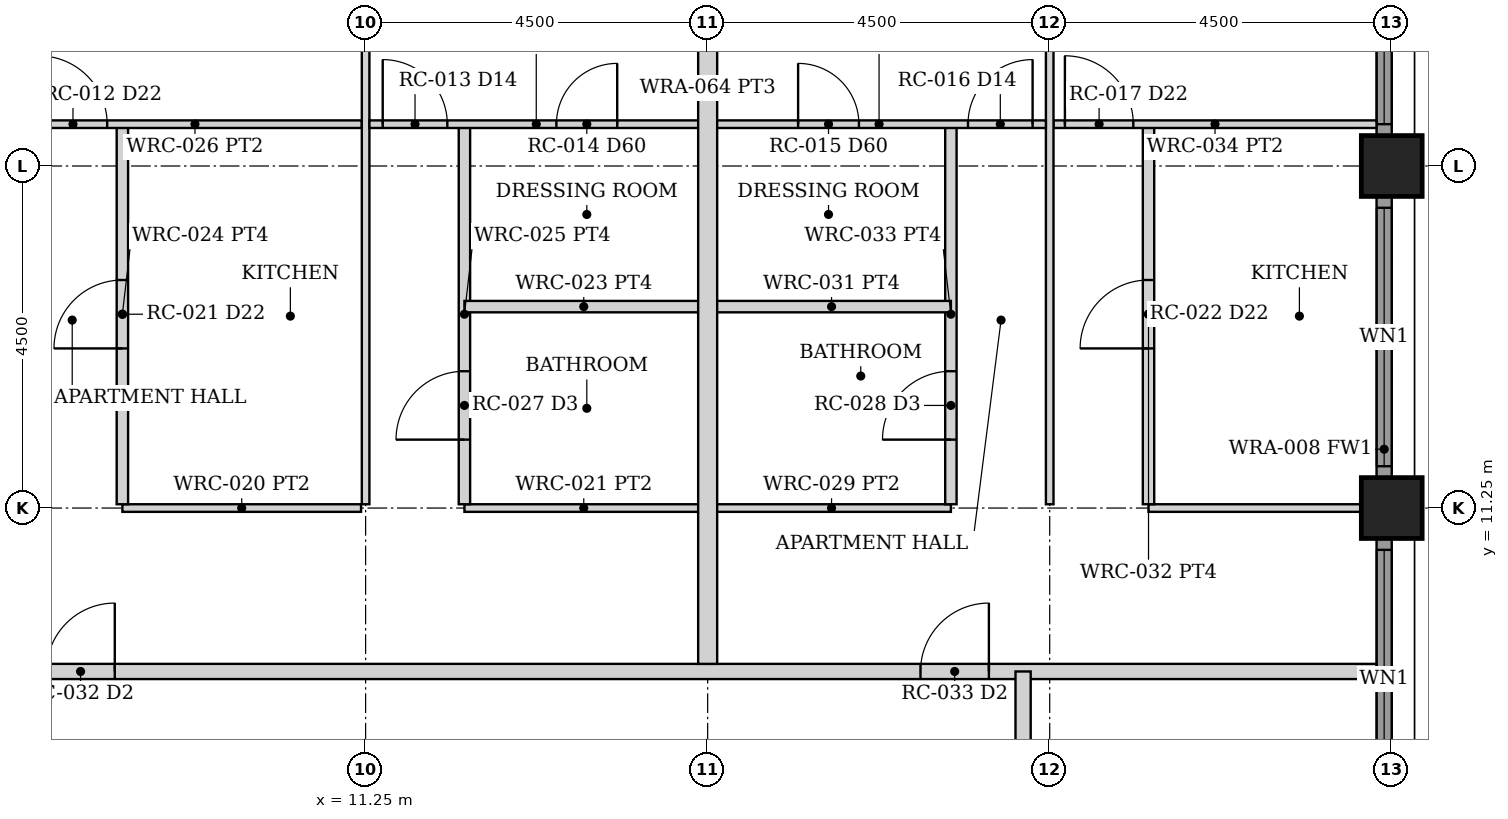
"""IFC4 building model, lengths in metres.
Left out: names, types, materials, properties, quantities, classifications, styles, units other than length and angle.
Written with IfcOpenShell. Run it as: python <this file> out.ifc"""

import sys

from ifc_helpers import new_model, si_unit, direction, frame, frame_2d, origin, origin_2d, place, context, subcontext, project, spatial, rectangle, hollow_rectangle, extrude, element, fill, save


model = new_model("IFC4")
c1 = context("Model", 3, precision=1e-05, world=origin(), true_north=direction((0.0, 1.0)))
c2 = subcontext(c1, "Body", "Model", "MODEL_VIEW")
j1 = project(units=[si_unit("LENGTHUNIT", "METRE"), si_unit("PLANEANGLEUNIT", "RADIAN")], contexts=[c1])
p1 = place(None, origin())
s1 = spatial("IfcSite", under=j1, at=p1, CompositionType="ELEMENT")
p2 = place(p1, origin())
s2 = spatial("IfcBuilding", under=s1, at=p2, CompositionType="ELEMENT")
p3 = place(p2, frame((0.0, 0.0, 47.5)))
s3 = spatial("IfcBuildingStorey", under=s2, at=p3, CompositionType="ELEMENT", Elevation=47.5)
for number, where, z_axis, x_axis in (
    (1, (24.75, 11.25, 0.0), (0.0, 0.0, 1.0), (1.0, 0.0, 0.0)),
    (2, (24.75, 15.75, 0.0), (0.0, 0.0, 1.0), (1.0, 0.0, 0.0)),
):
    element("IfcColumn", number, at=place(p3, frame(where, z_axis=z_axis, x_axis=x_axis)), inside=s3, PredefinedType="COLUMN", context=c2, shape_type="SweptSolid", body=[
        extrude(hollow_rectangle(XDim=0.8, YDim=0.8, WallThickness=0.07, at=origin_2d()), origin(), (0.0, 0.0, 1.0), 3.5),
    ])
p4 = place(p3, frame((24.65, 7.155, 0.0), z_axis=(0.0, 0.0, 1.0), x_axis=(0.0, 1.0, 0.0)))
e3 = element("IfcWall", 3, at=p4, inside=s3, PredefinedType="SOLIDWALL", context=c2, shape_type="SweptSolid", body=[
    extrude(rectangle(XDim=3.69, YDim=0.2, at=frame_2d((1.845, 0.0))), origin(), (0.0, 0.0, 1.0), 2.379),
])
p5 = place(p4, frame((0.145, 0.0, 0.3)))
e4 = element("IfcOpeningElement", 4, at=p5, cuts=e3, PredefinedType="OPENING", context=c2, shape_type="SweptSolid", body=[
    extrude(rectangle(XDim=3.4, YDim=1.929, at=frame_2d((1.7, 0.964))), frame((0.0, 0.11, 0.0), z_axis=(0.0, -1.0, 0.0), x_axis=(1.0, 0.0, 0.0)), (0.0, 0.0, 1.0), 0.22),
])
p6 = place(p3, frame((24.65, 11.655, 0.0), z_axis=(0.0, 0.0, 1.0), x_axis=(0.0, 1.0, 0.0)))
e5 = element("IfcWall", 5, at=p6, inside=s3, PredefinedType="SOLIDWALL", context=c2, shape_type="SweptSolid", body=[
    extrude(rectangle(XDim=3.69, YDim=0.2, at=frame_2d((1.845, 0.0))), origin(), (0.0, 0.0, 1.0), 2.379),
])
p7 = place(p6, frame((0.145, 0.0, 0.3)))
e6 = element("IfcOpeningElement", 6, at=p7, cuts=e5, PredefinedType="OPENING", context=c2, shape_type="SweptSolid", body=[
    extrude(rectangle(XDim=3.4, YDim=1.929, at=frame_2d((1.7, 0.964))), frame((0.0, 0.11, 0.0), z_axis=(0.0, -1.0, 0.0), x_axis=(1.0, 0.0, 0.0)), (0.0, 0.0, 1.0), 0.22),
])
p8 = place(p3, frame((24.65, 16.155, 0.0), z_axis=(0.0, 0.0, 1.0), x_axis=(0.0, 1.0, 0.0)))
e7 = element("IfcWall", 7, at=p8, inside=s3, PredefinedType="SOLIDWALL", context=c2, shape_type="SweptSolid", body=[
    extrude(rectangle(XDim=3.69, YDim=0.2, at=frame_2d((1.845, 0.0))), origin(), (0.0, 0.0, 1.0), 2.379),
])
p9 = place(p8, frame((0.145, 0.0, 0.3)))
e8 = element("IfcOpeningElement", 8, at=p9, cuts=e7, PredefinedType="OPENING", context=c2, shape_type="SweptSolid", body=[
    extrude(rectangle(XDim=3.4, YDim=1.929, at=frame_2d((1.7, 0.964))), frame((0.0, 0.11, 0.0), z_axis=(0.0, -1.0, 0.0), x_axis=(1.0, 0.0, 0.0)), (0.0, 0.0, 1.0), 0.22),
])
p10 = place(p3, frame((-24.55, 9.1, 0.0), z_axis=(0.0, 0.0, 1.0), x_axis=(1.0, 0.0, 0.0)))
e9 = element("IfcWall", 9, at=p10, inside=s3, PredefinedType="PARTITIONING", context=c2, shape_type="SweptSolid", body=[
    extrude(rectangle(XDim=49.1, YDim=0.2, at=frame_2d((24.55, 0.0))), origin(), (0.0, 0.0, 1.0), 2.373),
])
p11 = place(p10, frame((5.1, 0.0, 0.0)))
e10 = element("IfcOpeningElement", 10, at=p11, cuts=e9, PredefinedType="OPENING", context=c2, shape_type="SweptSolid", body=[
    extrude(rectangle(XDim=0.9, YDim=2.1, at=frame_2d((0.45, 1.05))), frame((0.0, 0.11, 0.0), z_axis=(0.0, -1.0, 0.0), x_axis=(1.0, 0.0, 0.0)), (0.0, 0.0, 1.0), 0.22),
])
p12 = place(p10, frame((13.6, 0.0, 0.0)))
e11 = element("IfcOpeningElement", 11, at=p12, cuts=e9, PredefinedType="OPENING", context=c2, shape_type="SweptSolid", body=[
    extrude(rectangle(XDim=0.9, YDim=2.1, at=frame_2d((0.45, 1.05))), frame((0.0, 0.11, 0.0), z_axis=(0.0, -1.0, 0.0), x_axis=(1.0, 0.0, 0.0)), (0.0, 0.0, 1.0), 0.22),
])
p13 = place(p10, frame((18.1, 0.0, 0.0)))
e12 = element("IfcOpeningElement", 12, at=p13, cuts=e9, PredefinedType="OPENING", context=c2, shape_type="SweptSolid", body=[
    extrude(rectangle(XDim=0.9, YDim=2.1, at=frame_2d((0.45, 1.05))), frame((0.0, 0.11, 0.0), z_axis=(0.0, -1.0, 0.0), x_axis=(1.0, 0.0, 0.0)), (0.0, 0.0, 1.0), 0.22),
])
p14 = place(p10, frame((31.6, 0.0, 0.0)))
e13 = element("IfcOpeningElement", 13, at=p14, cuts=e9, PredefinedType="OPENING", context=c2, shape_type="SweptSolid", body=[
    extrude(rectangle(XDim=0.9, YDim=2.1, at=frame_2d((0.45, 1.05))), frame((0.0, 0.11, 0.0), z_axis=(0.0, -1.0, 0.0), x_axis=(1.0, 0.0, 0.0)), (0.0, 0.0, 1.0), 0.22),
])
p15 = place(p10, frame((43.1, 0.0, 0.0)))
e14 = element("IfcOpeningElement", 14, at=p15, cuts=e9, PredefinedType="OPENING", context=c2, shape_type="SweptSolid", body=[
    extrude(rectangle(XDim=0.9, YDim=2.1, at=frame_2d((0.45, 1.05))), frame((0.0, 0.11, 0.0), z_axis=(0.0, -1.0, 0.0), x_axis=(1.0, 0.0, 0.0)), (0.0, 0.0, 1.0), 0.22),
])
p16 = place(p3, frame((19.9, -9.1, 0.0), z_axis=(0.0, 0.0, 1.0), x_axis=(0.0, 1.0, 0.0)))
e15 = element("IfcWall", 15, at=p16, inside=s3, PredefinedType="PARTITIONING", context=c2, shape_type="SweptSolid", body=[
    extrude(rectangle(XDim=18.2, YDim=0.2, at=frame_2d((9.1, 0.0))), origin(), (0.0, 0.0, 1.0), 2.373),
])
p17 = place(p16, frame((8.6, 0.0, 0.0)))
e16 = element("IfcOpeningElement", 16, at=p17, cuts=e15, PredefinedType="OPENING", context=c2, shape_type="SweptSolid", body=[
    extrude(rectangle(XDim=1.0, YDim=2.1, at=frame_2d((0.5, 1.05))), frame((0.0, 0.11, 0.0), z_axis=(0.0, -1.0, 0.0), x_axis=(1.0, 0.0, 0.0)), (0.0, 0.0, 1.0), 0.22),
])
p18 = place(p3, frame((8.05, 11.25, 0.0), z_axis=(0.0, 0.0, 1.0), x_axis=(1.0, 0.0, 0.0)))
e17 = element("IfcWall", 17, at=p18, inside=s3, PredefinedType="PARTITIONING", context=c2, shape_type="SweptSolid", body=[
    extrude(rectangle(XDim=3.14, YDim=0.1, at=frame_2d((1.57, 0.0))), origin(), (0.0, 0.0, 1.0), 2.373),
])
p19 = place(p3, frame((8.05, 11.3, 0.0), z_axis=(0.0, 0.0, 1.0), x_axis=(0.0, 1.0, 0.0)))
e18 = element("IfcWall", 18, at=p19, inside=s3, PredefinedType="PARTITIONING", context=c2, shape_type="SweptSolid", body=[
    extrude(rectangle(XDim=5.0, YDim=0.15, at=frame_2d((2.5, 0.0))), origin(), (0.0, 0.0, 1.0), 2.373),
])
p20 = place(p19, frame((2.05, 0.0, 0.0)))
e19 = element("IfcOpeningElement", 19, at=p20, cuts=e18, PredefinedType="OPENING", context=c2, shape_type="SweptSolid", body=[
    extrude(rectangle(XDim=0.9, YDim=2.1, at=frame_2d((0.45, 1.05))), frame((0.0, 0.085, 0.0), z_axis=(0.0, -1.0, 0.0), x_axis=(1.0, 0.0, 0.0)), (0.0, 0.0, 1.0), 0.17),
])
p21 = place(p3, frame((6.81, 16.3, 0.0), z_axis=(0.0, 0.0, 1.0), x_axis=(1.0, 0.0, 0.0)))
e20 = element("IfcWall", 20, at=p21, inside=s3, PredefinedType="PARTITIONING", context=c2, shape_type="SweptSolid", body=[
    extrude(rectangle(XDim=4.39, YDim=0.1, at=frame_2d((2.195, 0.0))), origin(), (0.0, 0.0, 1.0), 2.373),
])
p22 = place(p21, frame((0.14, 0.0, 0.0)))
e21 = element("IfcOpeningElement", 21, at=p22, cuts=e20, PredefinedType="OPENING", context=c2, shape_type="SweptSolid", body=[
    extrude(rectangle(XDim=0.9, YDim=2.1, at=frame_2d((0.45, 1.05))), frame((0.0, 0.06, 0.0), z_axis=(0.0, -1.0, 0.0), x_axis=(1.0, 0.0, 0.0)), (0.0, 0.0, 1.0), 0.12),
])
p23 = place(p3, frame((11.25, 11.3, 0.0), z_axis=(0.0, 0.0, 1.0), x_axis=(0.0, 1.0, 0.0)))
e22 = element("IfcWall", 22, at=p23, inside=s3, PredefinedType="PARTITIONING", context=c2, shape_type="SweptSolid", body=[
    extrude(rectangle(XDim=13.05, YDim=0.1, at=frame_2d((6.525, 0.0))), origin(), (0.0, 0.0, 1.0), 2.373),
])
p24 = place(p3, frame((12.55, 11.25, 0.0), z_axis=(0.0, 0.0, 1.0), x_axis=(1.0, 0.0, 0.0)))
e23 = element("IfcWall", 23, at=p24, inside=s3, PredefinedType="PARTITIONING", context=c2, shape_type="SweptSolid", body=[
    extrude(rectangle(XDim=3.14, YDim=0.1, at=frame_2d((1.57, 0.0))), origin(), (0.0, 0.0, 1.0), 2.373),
])
p25 = place(p3, frame((12.55, 11.3, 0.0), z_axis=(0.0, 0.0, 1.0), x_axis=(0.0, 1.0, 0.0)))
e24 = element("IfcWall", 24, at=p25, inside=s3, PredefinedType="PARTITIONING", context=c2, shape_type="SweptSolid", body=[
    extrude(rectangle(XDim=5.0, YDim=0.15, at=frame_2d((2.5, 0.0))), origin(), (0.0, 0.0, 1.0), 2.373),
])
p26 = place(p25, frame((0.85, 0.0, 0.0)))
e25 = element("IfcOpeningElement", 25, at=p26, cuts=e24, PredefinedType="OPENING", context=c2, shape_type="SweptSolid", body=[
    extrude(rectangle(XDim=0.9, YDim=2.1, at=frame_2d((0.45, 1.05))), frame((0.0, 0.085, 0.0), z_axis=(0.0, -1.0, 0.0), x_axis=(1.0, 0.0, 0.0)), (0.0, 0.0, 1.0), 0.17),
])
p27 = place(p3, frame((11.3, 16.3, 0.0), z_axis=(0.0, 0.0, 1.0), x_axis=(1.0, 0.0, 0.0)))
e26 = element("IfcWall", 26, at=p27, inside=s3, PredefinedType="PARTITIONING", context=c2, shape_type="SweptSolid", body=[
    extrude(rectangle(XDim=4.39, YDim=0.1, at=frame_2d((2.195, 0.0))), origin(), (0.0, 0.0, 1.0), 2.373),
])
p28 = place(p27, frame((0.175, 0.0, 0.0)))
e27 = element("IfcOpeningElement", 27, at=p28, cuts=e26, PredefinedType="OPENING", context=c2, shape_type="SweptSolid", body=[
    extrude(rectangle(XDim=0.85, YDim=2.1, at=frame_2d((0.425, 1.05))), frame((0.0, 0.06, 0.0), z_axis=(0.0, -1.0, 0.0), x_axis=(1.0, 0.0, 0.0)), (0.0, 0.0, 1.0), 0.12),
])
p29 = place(p27, frame((2.46, 0.0, 0.0)))
e28 = element("IfcOpeningElement", 28, at=p29, cuts=e26, PredefinedType="OPENING", context=c2, shape_type="SweptSolid", body=[
    extrude(rectangle(XDim=0.8, YDim=2.1, at=frame_2d((0.4, 1.05))), frame((0.0, 0.06, 0.0), z_axis=(0.0, -1.0, 0.0), x_axis=(1.0, 0.0, 0.0)), (0.0, 0.0, 1.0), 0.12),
])
p30 = place(p3, frame((12.55, 13.9, 0.0), z_axis=(0.0, 0.0, 1.0), x_axis=(1.0, 0.0, 0.0)))
e29 = element("IfcWall", 29, at=p30, inside=s3, PredefinedType="PARTITIONING", context=c2, shape_type="SweptSolid", body=[
    extrude(rectangle(XDim=3.14, YDim=0.15, at=frame_2d((1.57, 0.0))), origin(), (0.0, 0.0, 1.0), 2.373),
])
p31 = place(p3, frame((21.55, 11.25, 0.0), z_axis=(0.0, 0.0, 1.0), x_axis=(1.0, 0.0, 0.0)))
e30 = element("IfcWall", 30, at=p31, inside=s3, PredefinedType="PARTITIONING", context=c2, shape_type="SweptSolid", body=[
    extrude(rectangle(XDim=2.8, YDim=0.1, at=frame_2d((1.4, 0.0))), origin(), (0.0, 0.0, 1.0), 2.373),
])
p32 = place(p3, frame((21.55, 11.3, 0.0), z_axis=(0.0, 0.0, 1.0), x_axis=(0.0, 1.0, 0.0)))
e31 = element("IfcWall", 31, at=p32, inside=s3, PredefinedType="PARTITIONING", context=c2, shape_type="SweptSolid", body=[
    extrude(rectangle(XDim=5.0, YDim=0.15, at=frame_2d((2.5, 0.0))), origin(), (0.0, 0.0, 1.0), 2.373),
])
p33 = place(p32, frame((2.05, 0.0, 0.0)))
e32 = element("IfcOpeningElement", 32, at=p33, cuts=e31, PredefinedType="OPENING", context=c2, shape_type="SweptSolid", body=[
    extrude(rectangle(XDim=0.9, YDim=2.1, at=frame_2d((0.45, 1.05))), frame((0.0, 0.085, 0.0), z_axis=(0.0, -1.0, 0.0), x_axis=(1.0, 0.0, 0.0)), (0.0, 0.0, 1.0), 0.17),
])
p34 = place(p3, frame((20.3, 16.3, 0.0), z_axis=(0.0, 0.0, 1.0), x_axis=(1.0, 0.0, 0.0)))
e33 = element("IfcWall", 33, at=p34, inside=s3, PredefinedType="PARTITIONING", context=c2, shape_type="SweptSolid", body=[
    extrude(rectangle(XDim=4.25, YDim=0.1, at=frame_2d((2.125, 0.0))), origin(), (0.0, 0.0, 1.0), 2.373),
])
p35 = place(p34, frame((0.15, 0.0, 0.0)))
e34 = element("IfcOpeningElement", 34, at=p35, cuts=e33, PredefinedType="OPENING", context=c2, shape_type="SweptSolid", body=[
    extrude(rectangle(XDim=0.9, YDim=2.1, at=frame_2d((0.45, 1.05))), frame((0.0, 0.06, 0.0), z_axis=(0.0, -1.0, 0.0), x_axis=(1.0, 0.0, 0.0)), (0.0, 0.0, 1.0), 0.12),
])
p36 = place(p3, frame((20.25, 11.3, 0.0), z_axis=(0.0, 0.0, 1.0), x_axis=(0.0, 1.0, 0.0)))
e35 = element("IfcWall", 35, at=p36, inside=s3, PredefinedType="PARTITIONING", context=c2, shape_type="SweptSolid", body=[
    extrude(rectangle(XDim=13.05, YDim=0.1, at=frame_2d((6.525, 0.0))), origin(), (0.0, 0.0, 1.0), 2.373),
])
p37 = place(p3, frame((15.81, 11.25, 0.0), z_axis=(0.0, 0.0, 1.0), x_axis=(1.0, 0.0, 0.0)))
e36 = element("IfcWall", 36, at=p37, inside=s3, PredefinedType="PARTITIONING", context=c2, shape_type="SweptSolid", body=[
    extrude(rectangle(XDim=3.14, YDim=0.1, at=frame_2d((1.57, 0.0))), origin(), (0.0, 0.0, 1.0), 2.373),
])
p38 = place(p3, frame((18.95, 11.3, 0.0), z_axis=(0.0, 0.0, 1.0), x_axis=(0.0, 1.0, 0.0)))
e37 = element("IfcWall", 37, at=p38, inside=s3, PredefinedType="PARTITIONING", context=c2, shape_type="SweptSolid", body=[
    extrude(rectangle(XDim=5.0, YDim=0.15, at=frame_2d((2.5, 0.0))), origin(), (0.0, 0.0, 1.0), 2.373),
])
p39 = place(p38, frame((0.85, 0.0, 0.0)))
e38 = element("IfcOpeningElement", 38, at=p39, cuts=e37, PredefinedType="OPENING", context=c2, shape_type="SweptSolid", body=[
    extrude(rectangle(XDim=0.9, YDim=2.1, at=frame_2d((0.45, 1.05))), frame((0.0, 0.085, 0.0), z_axis=(0.0, -1.0, 0.0), x_axis=(1.0, 0.0, 0.0)), (0.0, 0.0, 1.0), 0.17),
])
p40 = place(p3, frame((15.81, 16.3, 0.0), z_axis=(0.0, 0.0, 1.0), x_axis=(1.0, 0.0, 0.0)))
e39 = element("IfcWall", 39, at=p40, inside=s3, PredefinedType="PARTITIONING", context=c2, shape_type="SweptSolid", body=[
    extrude(rectangle(XDim=4.39, YDim=0.1, at=frame_2d((2.195, 0.0))), origin(), (0.0, 0.0, 1.0), 2.373),
])
p41 = place(p40, frame((3.365, 0.0, 0.0)))
e40 = element("IfcOpeningElement", 40, at=p41, cuts=e39, PredefinedType="OPENING", context=c2, shape_type="SweptSolid", body=[
    extrude(rectangle(XDim=0.85, YDim=2.1, at=frame_2d((0.425, 1.05))), frame((0.0, 0.06, 0.0), z_axis=(0.0, -1.0, 0.0), x_axis=(1.0, 0.0, 0.0)), (0.0, 0.0, 1.0), 0.12),
])
p42 = place(p40, frame((1.13, 0.0, 0.0)))
e41 = element("IfcOpeningElement", 41, at=p42, cuts=e39, PredefinedType="OPENING", context=c2, shape_type="SweptSolid", body=[
    extrude(rectangle(XDim=0.8, YDim=2.1, at=frame_2d((0.4, 1.05))), frame((0.0, 0.06, 0.0), z_axis=(0.0, -1.0, 0.0), x_axis=(1.0, 0.0, 0.0)), (0.0, 0.0, 1.0), 0.12),
])
p43 = place(p3, frame((15.81, 13.9, 0.0), z_axis=(0.0, 0.0, 1.0), x_axis=(1.0, 0.0, 0.0)))
e42 = element("IfcWall", 42, at=p43, inside=s3, PredefinedType="PARTITIONING", context=c2, shape_type="SweptSolid", body=[
    extrude(rectangle(XDim=3.14, YDim=0.15, at=frame_2d((1.57, 0.0))), origin(), (0.0, 0.0, 1.0), 2.373),
])
p44 = place(p3, frame((15.75, 9.2, 0.0), z_axis=(0.0, 0.0, 1.0), x_axis=(0.0, 1.0, 0.0)))
e43 = element("IfcWall", 43, at=p44, inside=s3, PredefinedType="PARTITIONING", context=c2, shape_type="SweptSolid", body=[
    extrude(rectangle(XDim=15.15, YDim=0.25, at=frame_2d((7.575, 0.0))), origin(), (0.0, 0.0, 1.0), 2.373),
])
p45 = place(p5, origin())
e44 = element("IfcWindow", 44, at=p45, inside=s3, PartitioningType="SINGLE_PANEL", PredefinedType="WINDOW", context=c2, shape_type="SweptSolid", body=[
    extrude(rectangle(XDim=3.4, YDim=1.929, at=frame_2d((1.7, 0.964))), frame((0.0, 0.03, 0.0), z_axis=(0.0, -1.0, 0.0), x_axis=(1.0, 0.0, 0.0)), (0.0, 0.0, 1.0), 0.06),
])
fill(e4, e44)
p46 = place(p7, origin())
e45 = element("IfcWindow", 45, at=p46, inside=s3, PartitioningType="SINGLE_PANEL", PredefinedType="WINDOW", context=c2, shape_type="SweptSolid", body=[
    extrude(rectangle(XDim=3.4, YDim=1.929, at=frame_2d((1.7, 0.964))), frame((0.0, 0.03, 0.0), z_axis=(0.0, -1.0, 0.0), x_axis=(1.0, 0.0, 0.0)), (0.0, 0.0, 1.0), 0.06),
])
fill(e6, e45)
p47 = place(p9, origin())
e46 = element("IfcWindow", 46, at=p47, inside=s3, PartitioningType="SINGLE_PANEL", PredefinedType="WINDOW", context=c2, shape_type="SweptSolid", body=[
    extrude(rectangle(XDim=3.4, YDim=1.929, at=frame_2d((1.7, 0.964))), frame((0.0, 0.03, 0.0), z_axis=(0.0, -1.0, 0.0), x_axis=(1.0, 0.0, 0.0)), (0.0, 0.0, 1.0), 0.06),
])
fill(e8, e46)
p48 = place(p14, origin())
e47 = element("IfcDoor", 47, at=p48, inside=s3, OperationType="SINGLE_SWING_RIGHT", PredefinedType="DOOR", context=c2, shape_type="SweptSolid", body=[
    extrude(rectangle(XDim=0.9, YDim=2.1, at=frame_2d((0.45, 1.05))), frame((0.0, 0.025, 0.0), z_axis=(0.0, -1.0, 0.0), x_axis=(1.0, 0.0, 0.0)), (0.0, 0.0, 1.0), 0.05),
])
fill(e13, e47)
p49 = place(p20, origin())
e48 = element("IfcDoor", 48, at=p49, inside=s3, OperationType="SINGLE_SWING_LEFT", PredefinedType="DOOR", context=c2, shape_type="SweptSolid", body=[
    extrude(rectangle(XDim=0.9, YDim=2.1, at=frame_2d((0.45, 1.05))), frame((0.0, 0.025, 0.0), z_axis=(0.0, -1.0, 0.0), x_axis=(1.0, 0.0, 0.0)), (0.0, 0.0, 1.0), 0.05),
])
fill(e19, e48)
p50 = place(p22, origin())
e49 = element("IfcDoor", 49, at=p50, inside=s3, OperationType="SINGLE_SWING_LEFT", PredefinedType="DOOR", context=c2, shape_type="SweptSolid", body=[
    extrude(rectangle(XDim=0.9, YDim=2.1, at=frame_2d((0.45, 1.05))), frame((0.0, 0.025, 0.0), z_axis=(0.0, -1.0, 0.0), x_axis=(1.0, 0.0, 0.0)), (0.0, 0.0, 1.0), 0.05),
])
fill(e21, e49)
p51 = place(p28, origin())
e50 = element("IfcDoor", 50, at=p51, inside=s3, OperationType="SINGLE_SWING_LEFT", PredefinedType="DOOR", context=c2, shape_type="SweptSolid", body=[
    extrude(rectangle(XDim=0.85, YDim=2.1, at=frame_2d((0.425, 1.05))), frame((0.0, 0.025, 0.0), z_axis=(0.0, -1.0, 0.0), x_axis=(1.0, 0.0, 0.0)), (0.0, 0.0, 1.0), 0.05),
])
fill(e27, e50)
p52 = place(p26, origin())
e51 = element("IfcDoor", 51, at=p52, inside=s3, OperationType="SINGLE_SWING_LEFT", PredefinedType="DOOR", context=c2, shape_type="SweptSolid", body=[
    extrude(rectangle(XDim=0.9, YDim=2.1, at=frame_2d((0.45, 1.05))), frame((0.0, 0.025, 0.0), z_axis=(0.0, -1.0, 0.0), x_axis=(1.0, 0.0, 0.0)), (0.0, 0.0, 1.0), 0.05),
])
fill(e25, e51)
p53 = place(p29, origin())
e52 = element("IfcDoor", 52, at=p53, inside=s3, OperationType="SINGLE_SWING_RIGHT", PredefinedType="DOOR", context=c2, shape_type="SweptSolid", body=[
    extrude(rectangle(XDim=0.8, YDim=2.1, at=frame_2d((0.4, 1.05))), frame((0.0, 0.025, 0.0), z_axis=(0.0, -1.0, 0.0), x_axis=(1.0, 0.0, 0.0)), (0.0, 0.0, 1.0), 0.05),
])
fill(e28, e52)
p54 = place(p15, origin())
e53 = element("IfcDoor", 53, at=p54, inside=s3, OperationType="SINGLE_SWING_RIGHT", PredefinedType="DOOR", context=c2, shape_type="SweptSolid", body=[
    extrude(rectangle(XDim=0.9, YDim=2.1, at=frame_2d((0.45, 1.05))), frame((0.0, 0.025, 0.0), z_axis=(0.0, -1.0, 0.0), x_axis=(1.0, 0.0, 0.0)), (0.0, 0.0, 1.0), 0.05),
])
fill(e14, e53)
p55 = place(p33, origin())
e54 = element("IfcDoor", 54, at=p55, inside=s3, OperationType="SINGLE_SWING_LEFT", PredefinedType="DOOR", context=c2, shape_type="SweptSolid", body=[
    extrude(rectangle(XDim=0.9, YDim=2.1, at=frame_2d((0.45, 1.05))), frame((0.0, 0.025, 0.0), z_axis=(0.0, -1.0, 0.0), x_axis=(1.0, 0.0, 0.0)), (0.0, 0.0, 1.0), 0.05),
])
fill(e32, e54)
p56 = place(p35, origin())
e55 = element("IfcDoor", 55, at=p56, inside=s3, OperationType="SINGLE_SWING_LEFT", PredefinedType="DOOR", context=c2, shape_type="SweptSolid", body=[
    extrude(rectangle(XDim=0.9, YDim=2.1, at=frame_2d((0.45, 1.05))), frame((0.0, 0.025, 0.0), z_axis=(0.0, -1.0, 0.0), x_axis=(1.0, 0.0, 0.0)), (0.0, 0.0, 1.0), 0.05),
])
fill(e34, e55)
p57 = place(p41, origin())
e56 = element("IfcDoor", 56, at=p57, inside=s3, OperationType="SINGLE_SWING_RIGHT", PredefinedType="DOOR", context=c2, shape_type="SweptSolid", body=[
    extrude(rectangle(XDim=0.85, YDim=2.1, at=frame_2d((0.425, 1.05))), frame((0.0, 0.025, 0.0), z_axis=(0.0, -1.0, 0.0), x_axis=(1.0, 0.0, 0.0)), (0.0, 0.0, 1.0), 0.05),
])
fill(e40, e56)
p58 = place(p39, origin())
e57 = element("IfcDoor", 57, at=p58, inside=s3, OperationType="SINGLE_SWING_LEFT", PredefinedType="DOOR", context=c2, shape_type="SweptSolid", body=[
    extrude(rectangle(XDim=0.9, YDim=2.1, at=frame_2d((0.45, 1.05))), frame((0.0, 0.025, 0.0), z_axis=(0.0, -1.0, 0.0), x_axis=(1.0, 0.0, 0.0)), (0.0, 0.0, 1.0), 0.05),
])
fill(e38, e57)
p59 = place(p42, origin())
e58 = element("IfcDoor", 58, at=p59, inside=s3, OperationType="SINGLE_SWING_LEFT", PredefinedType="DOOR", context=c2, shape_type="SweptSolid", body=[
    extrude(rectangle(XDim=0.8, YDim=2.1, at=frame_2d((0.4, 1.05))), frame((0.0, 0.025, 0.0), z_axis=(0.0, -1.0, 0.0), x_axis=(1.0, 0.0, 0.0)), (0.0, 0.0, 1.0), 0.05),
])
fill(e41, e58)
save(model, sys.argv[1])
